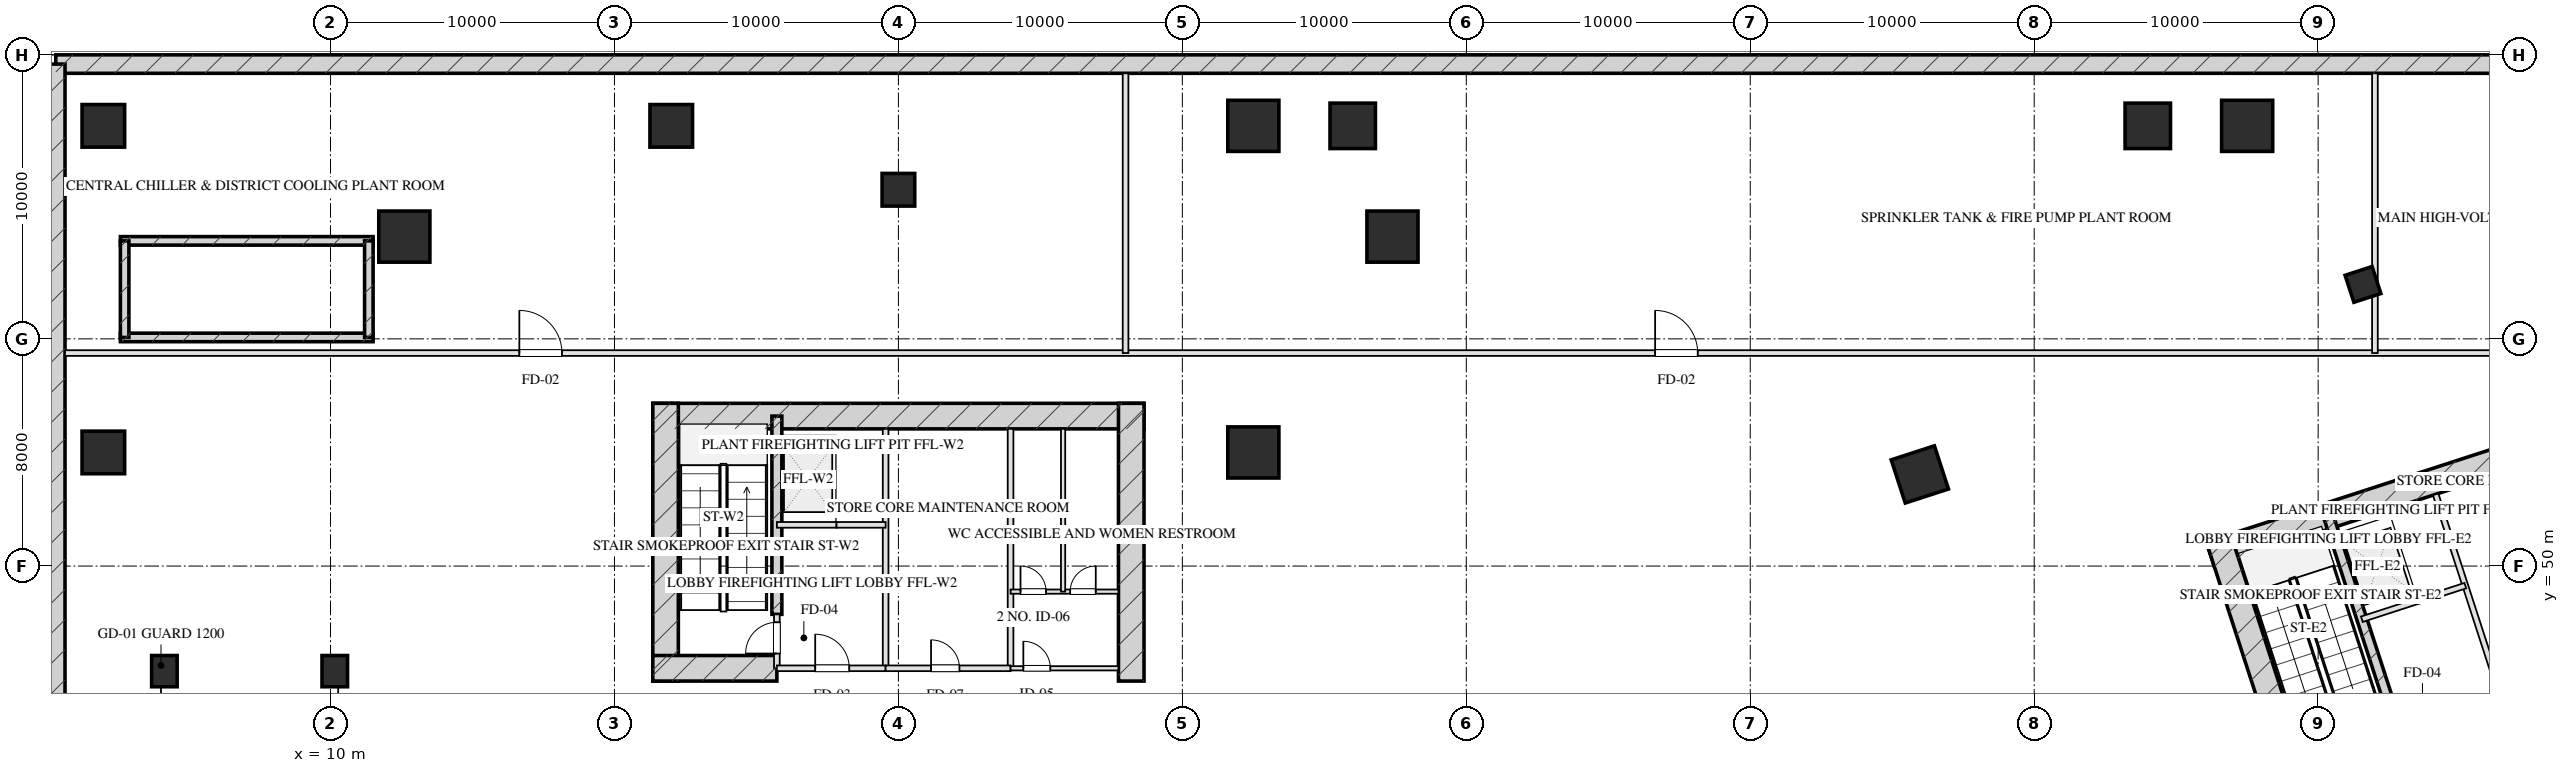
"""IFC4 building model, lengths in metres.
Left out: names, types, materials, properties, quantities, classifications, styles, units other than length and angle.
Written with IfcOpenShell. Run it as: python <this file> out.ifc"""

import sys

from ifc_helpers import new_model, si_unit, direction, frame, frame_2d, origin, origin_2d, place, context, subcontext, project, spatial, rectangle, hollow_rectangle, extrude, element, fill, save


model = new_model("IFC4")
c1 = context("Model", 3, precision=1e-05, world=origin(), true_north=direction((0.0, 1.0)))
c2 = subcontext(c1, "Body", "Model", "MODEL_VIEW")
j1 = project(units=[si_unit("LENGTHUNIT", "METRE"), si_unit("PLANEANGLEUNIT", "RADIAN")], contexts=[c1])
p1 = place(None, origin())
s1 = spatial("IfcSite", under=j1, at=p1, CompositionType="ELEMENT")
p2 = place(p1, origin())
s2 = spatial("IfcBuilding", under=s1, at=p2, CompositionType="ELEMENT")
p3 = place(p2, frame((0.0, 0.0, -12.0)))
s3 = spatial("IfcBuildingStorey", under=s2, at=p3, CompositionType="ELEMENT", Elevation=-12.0)
p4 = place(p3, frame((21.35, 55.28, 0.0), z_axis=(0.0, 0.0, 1.0), x_axis=(1.0, 0.0, 0.0)))
e1 = element("IfcWall", 1, at=p4, inside=s3, PredefinedType="SHEAR", context=c2, shape_type="SweptSolid", body=[
    extrude(rectangle(XDim=17.3, YDim=0.9, at=frame_2d((8.65, 0.0))), origin(), (0.0, 0.0, 1.0), 6.0),
])
for number, where, z_axis, x_axis in (
    (2, (21.8, 45.95, 0.0), (0.0, 0.0, 1.0), (0.0, 1.0, 0.0)),
    (3, (38.2, 45.95, 0.0), (0.0, 0.0, 1.0), (0.0, 1.0, 0.0)),
):
    element("IfcWall", number, at=place(p3, frame(where, z_axis=z_axis, x_axis=x_axis)), inside=s3, PredefinedType="SHEAR", context=c2, shape_type="SweptSolid", body=[
        extrude(rectangle(XDim=9.78, YDim=0.9, at=frame_2d((4.89, 0.0))), origin(), (0.0, 0.0, 1.0), 6.0),
    ])
p5 = place(p3, frame((25.72, 48.3, 0.0), z_axis=(0.0, 0.0, 1.0), x_axis=(0.0, 1.0, 0.0)))
e4 = element("IfcWall", 4, at=p5, inside=s3, PredefinedType="SHEAR", context=c2, shape_type="SweptSolid", body=[
    extrude(rectangle(XDim=6.98, YDim=0.35, at=frame_2d((3.49, 0.0))), origin(), (0.0, 0.0, 1.0), 6.0),
])
p6 = place(p3, frame((21.35, 46.4, 0.0), z_axis=(0.0, 0.0, 1.0), x_axis=(1.0, 0.0, 0.0)))
e5 = element("IfcWall", 5, at=p6, inside=s3, PredefinedType="SHEAR", context=c2, shape_type="SweptSolid", body=[
    extrude(rectangle(XDim=4.37, YDim=0.9, at=frame_2d((2.185, 0.0))), origin(), (0.0, 0.0, 1.0), 6.0),
])
p7 = place(p3, frame((76.201, 50.419, 0.0), z_axis=(0.0, 0.0, 1.0), x_axis=(0.951056412142, 0.309017314926, 0.0)))
e6 = element("IfcWall", 6, at=p7, inside=s3, PredefinedType="SHEAR", context=c2, shape_type="SweptSolid", body=[
    extrude(rectangle(XDim=16.7, YDim=0.9, at=frame_2d((8.35, 0.0))), origin(), (0.0, 0.0, 1.0), 6.0),
])
p8 = place(p3, frame((79.512, 41.685, 0.0), z_axis=(0.0, 0.0, 1.0), x_axis=(-0.309021722829, 0.951054979914, 0.0)))
e7 = element("IfcWall", 7, at=p8, inside=s3, PredefinedType="SHEAR", context=c2, shape_type="SweptSolid", body=[
    extrude(rectangle(XDim=9.78, YDim=0.9, at=frame_2d((4.89, 0.0))), origin(), (0.0, 0.0, 1.0), 6.0),
])
p9 = place(p3, frame((82.514, 45.131, 0.0), z_axis=(0.0, 0.0, 1.0), x_axis=(-0.308988790936, 0.951065679686, 0.0)))
e8 = element("IfcWall", 8, at=p9, inside=s3, PredefinedType="SHEAR", context=c2, shape_type="SweptSolid", body=[
    extrude(rectangle(XDim=6.98, YDim=0.35, at=frame_2d((3.49, 0.0))), origin(), (0.0, 0.0, 1.0), 6.0),
])
for number, where, z_axis, x_axis in (
    (9, (2.6, 58.05, 0.0), (0.0, 0.0, 1.0), (1.0, 0.0, 0.0)),
    (10, (2.6, 61.45, 0.0), (0.0, 0.0, 1.0), (1.0, 0.0, 0.0)),
):
    element("IfcWall", number, at=place(p3, frame(where, z_axis=z_axis, x_axis=x_axis)), inside=s3, PredefinedType="SHEAR", context=c2, shape_type="SweptSolid", body=[
        extrude(rectangle(XDim=8.9, YDim=0.3, at=frame_2d((4.45, 0.0))), origin(), (0.0, 0.0, 1.0), 6.0),
    ])
for number, where, z_axis, x_axis in (
    (11, (11.35, 58.05, 0.0), (0.0, 0.0, 1.0), (0.0, 1.0, 0.0)),
    (12, (2.75, 58.05, 0.0), (0.0, 0.0, 1.0), (0.0, 1.0, 0.0)),
):
    element("IfcWall", number, at=place(p3, frame(where, z_axis=z_axis, x_axis=x_axis)), inside=s3, PredefinedType="SHEAR", context=c2, shape_type="SweptSolid", body=[
        extrude(rectangle(XDim=3.4, YDim=0.3, at=frame_2d((1.7, 0.0))), origin(), (0.0, 0.0, 1.0), 6.0),
    ])
p10 = place(p3, frame((0.325, 67.675, 0.0), z_axis=(0.0, 0.0, 1.0), x_axis=(1.0, 0.0, 0.0)))
e13 = element("IfcWall", 13, at=p10, inside=s3, PredefinedType="SHEAR", context=c2, shape_type="SweptSolid", body=[
    extrude(rectangle(XDim=119.35, YDim=0.65, at=frame_2d((59.675, 0.0))), origin(), (0.0, 0.0, 1.0), 6.0),
])
p11 = place(p3, frame((0.325, 0.325, 0.0), z_axis=(0.0, 0.0, 1.0), x_axis=(0.0, 1.0, 0.0)))
e14 = element("IfcWall", 14, at=p11, inside=s3, PredefinedType="SHEAR", context=c2, shape_type="SweptSolid", body=[
    extrude(rectangle(XDim=67.35, YDim=0.65, at=frame_2d((33.675, 0.0))), origin(), (0.0, 0.0, 1.0), 6.0),
])
for number, where, z_axis, x_axis in (
    (15, (4.15, 46.3, 0.0), (0.0, 0.0, 1.0), (1.0, 0.0, 0.0)),
    (16, (10.15, 46.3, 0.0), (0.0, 0.0, 1.0), (1.0, 0.0, 0.0)),
):
    element("IfcColumn", number, at=place(p3, frame(where, z_axis=z_axis, x_axis=x_axis)), inside=s3, PredefinedType="COLUMN", context=c2, shape_type="SweptSolid", body=[
        extrude(rectangle(XDim=0.9, YDim=1.1, at=origin_2d()), origin(), (0.0, 0.0, 1.0), 5.65),
    ])
for number, where, z_axis, x_axis in (
    (17, (2.0, 54.0, 0.0), (0.0, 0.0, 1.0), (1.0, 0.0, 0.0)),
    (18, (2.0, 65.5, 0.0), (0.0, 0.0, 1.0), (1.0, 0.0, 0.0)),
    (19, (22.0, 65.5, 0.0), (0.0, 0.0, 1.0), (1.0, 0.0, 0.0)),
):
    element("IfcColumn", number, at=place(p3, frame(where, z_axis=z_axis, x_axis=x_axis)), inside=s3, PredefinedType="COLUMN", context=c2, shape_type="SweptSolid", body=[
        extrude(rectangle(XDim=1.5, YDim=1.5, at=origin_2d()), origin(), (0.0, 0.0, 1.0), 6.001),
    ])
for number, where, z_axis, x_axis in (
    (20, (42.5, 54.0, 0.0), (0.0, 0.0, 1.0), (1.0, 0.0, 0.0)),
    (21, (42.5, 65.5, 0.0), (0.0, 0.0, 1.0), (1.0, 0.0, 0.0)),
    (22, (77.5, 65.5, 0.0), (0.0, 0.0, 1.0), (1.0, 0.0, 0.0)),
):
    element("IfcColumn", number, at=place(p3, frame(where, z_axis=z_axis, x_axis=x_axis)), inside=s3, PredefinedType="COLUMN", context=c2, shape_type="SweptSolid", body=[
        extrude(hollow_rectangle(XDim=1.8, YDim=1.8, WallThickness=0.06, at=origin_2d()), origin(), (0.0, 0.0, 1.0), 6.001),
    ])
for number, where, z_axis, x_axis in (
    (23, (46.0, 65.5, 0.0), (0.0, 0.0, 1.0), (1.0, 0.0, 0.0)),
    (24, (74.0, 65.5, 0.0), (0.0, 0.0, 1.0), (1.0, 0.0, 0.0)),
):
    element("IfcColumn", number, at=place(p3, frame(where, z_axis=z_axis, x_axis=x_axis)), inside=s3, PredefinedType="COLUMN", context=c2, shape_type="SweptSolid", body=[
        extrude(hollow_rectangle(XDim=1.6, YDim=1.6, WallThickness=0.055, at=origin_2d()), origin(), (0.0, 0.0, 1.0), 6.001),
    ])
for number, where, z_axis, x_axis in (
    (25, (47.4, 61.6, 0.0), (0.0, 0.0, 1.0), (1.0, 0.0, 0.0)),
    (26, (12.6, 61.6, 0.0), (0.0, 0.0, 1.0), (1.0, 0.0, 0.0)),
):
    element("IfcColumn", number, at=place(p3, frame(where, z_axis=z_axis, x_axis=x_axis)), inside=s3, PredefinedType="COLUMN", context=c2, shape_type="SweptSolid", body=[
        extrude(hollow_rectangle(XDim=1.8, YDim=1.8, WallThickness=0.06, at=origin_2d()), origin(), (0.0, 0.0, 1.0), 6.001),
    ])
p12 = place(p3, frame((30.0, 63.25, 0.0), z_axis=(0.0, 0.0, 1.0), x_axis=(1.0, 0.0, 0.0)))
e27 = element("IfcColumn", 27, at=p12, inside=s3, PredefinedType="COLUMN", context=c2, shape_type="SweptSolid", body=[
    extrude(hollow_rectangle(XDim=1.15, YDim=1.15, WallThickness=0.04, at=origin_2d()), origin(), (0.0, 0.0, 1.0), 6.001),
])
p13 = place(p3, frame((65.973, 53.226, 0.0), z_axis=(0.0, 0.0, 1.0), x_axis=(0.951056516295, 0.309016994375, 0.0)))
e28 = element("IfcColumn", 28, at=p13, inside=s3, PredefinedType="COLUMN", context=c2, shape_type="SweptSolid", body=[
    extrude(hollow_rectangle(XDim=1.6, YDim=1.6, WallThickness=0.055, at=origin_2d()), origin(), (0.0, 0.0, 1.0), 6.001),
])
p14 = place(p3, frame((81.579, 59.916, 0.0), z_axis=(0.0, 0.0, 1.0), x_axis=(0.951056516295, 0.309016994375, 0.0)))
e29 = element("IfcColumn", 29, at=p14, inside=s3, PredefinedType="COLUMN", context=c2, shape_type="SweptSolid", body=[
    extrude(hollow_rectangle(XDim=1.0, YDim=1.0, WallThickness=0.036, at=origin_2d()), origin(), (0.0, 0.0, 1.0), 6.001),
])
p15 = place(p3, frame((25.72, 46.4, 0.0), z_axis=(0.0, 0.0, 1.0), x_axis=(0.0, 1.0, 0.0)))
e30 = element("IfcWall", 30, at=p15, inside=s3, PredefinedType="PARTITIONING", context=c2, shape_type="SweptSolid", body=[
    extrude(rectangle(XDim=1.9, YDim=0.2, at=frame_2d((0.95, 0.0))), origin(), (0.0, 0.0, 1.0), 5.635),
])
p16 = place(p15, frame((0.52, 0.0, 0.0)))
e31 = element("IfcOpeningElement", 31, at=p16, cuts=e30, PredefinedType="OPENING", context=c2, shape_type="SweptSolid", body=[
    extrude(rectangle(XDim=1.1, YDim=2.05, at=frame_2d((0.55, 1.025))), frame((0.0, 0.11, 0.0), z_axis=(0.0, -1.0, 0.0), x_axis=(1.0, 0.0, 0.0)), (0.0, 0.0, 1.0), 0.22),
])
p17 = place(p3, frame((29.55, 46.4, 0.0), z_axis=(0.0, 0.0, 1.0), x_axis=(0.0, 1.0, 0.0)))
e32 = element("IfcWall", 32, at=p17, inside=s3, PredefinedType="PARTITIONING", context=c2, shape_type="SweptSolid", body=[
    extrude(rectangle(XDim=8.43, YDim=0.2, at=frame_2d((4.215, 0.0))), origin(), (0.0, 0.0, 1.0), 5.635),
])
p18 = place(p3, frame((25.72, 46.4, 0.0), z_axis=(0.0, 0.0, 1.0), x_axis=(1.0, 0.0, 0.0)))
e33 = element("IfcWall", 33, at=p18, inside=s3, PredefinedType="PARTITIONING", context=c2, shape_type="SweptSolid", body=[
    extrude(rectangle(XDim=3.83, YDim=0.2, at=frame_2d((1.915, 0.0))), origin(), (0.0, 0.0, 1.0), 5.635),
])
p19 = place(p18, frame((1.35, 0.0, 0.0)))
e34 = element("IfcOpeningElement", 34, at=p19, cuts=e33, PredefinedType="OPENING", context=c2, shape_type="SweptSolid", body=[
    extrude(rectangle(XDim=1.2, YDim=2.05, at=frame_2d((0.6, 1.025))), frame((0.0, 0.11, 0.0), z_axis=(0.0, -1.0, 0.0), x_axis=(1.0, 0.0, 0.0)), (0.0, 0.0, 1.0), 0.22),
])
p20 = place(p3, frame((25.72, 51.45, 0.0), z_axis=(0.0, 0.0, 1.0), x_axis=(1.0, 0.0, 0.0)))
e35 = element("IfcWall", 35, at=p20, inside=s3, PredefinedType="PARTITIONING", context=c2, shape_type="SweptSolid", body=[
    extrude(rectangle(XDim=2.1, YDim=0.2, at=frame_2d((1.05, 0.0))), origin(), (0.0, 0.0, 1.0), 5.635),
])
p21 = place(p3, frame((27.82, 51.45, 0.0), z_axis=(0.0, 0.0, 1.0), x_axis=(1.0, 0.0, 0.0)))
e36 = element("IfcWall", 36, at=p21, inside=s3, PredefinedType="PARTITIONING", context=c2, shape_type="SweptSolid", body=[
    extrude(rectangle(XDim=1.73, YDim=0.2, at=frame_2d((0.865, 0.0))), origin(), (0.0, 0.0, 1.0), 5.635),
])
p22 = place(p3, frame((33.95, 46.4, 0.0), z_axis=(0.0, 0.0, 1.0), x_axis=(0.0, 1.0, 0.0)))
e37 = element("IfcWall", 37, at=p22, inside=s3, PredefinedType="PARTITIONING", context=c2, shape_type="SweptSolid", body=[
    extrude(rectangle(XDim=8.43, YDim=0.2, at=frame_2d((4.215, 0.0))), origin(), (0.0, 0.0, 1.0), 5.635),
])
p23 = place(p3, frame((29.55, 46.4, 0.0), z_axis=(0.0, 0.0, 1.0), x_axis=(1.0, 0.0, 0.0)))
e38 = element("IfcWall", 38, at=p23, inside=s3, PredefinedType="PARTITIONING", context=c2, shape_type="SweptSolid", body=[
    extrude(rectangle(XDim=4.4, YDim=0.2, at=frame_2d((2.2, 0.0))), origin(), (0.0, 0.0, 1.0), 5.635),
])
p24 = place(p23, frame((1.6, 0.0, 0.0)))
e39 = element("IfcOpeningElement", 39, at=p24, cuts=e38, PredefinedType="OPENING", context=c2, shape_type="SweptSolid", body=[
    extrude(rectangle(XDim=1.0, YDim=2.05, at=frame_2d((0.5, 1.025))), frame((0.0, 0.11, 0.0), z_axis=(0.0, -1.0, 0.0), x_axis=(1.0, 0.0, 0.0)), (0.0, 0.0, 1.0), 0.22),
])
p25 = place(p3, frame((33.95, 46.4, 0.0), z_axis=(0.0, 0.0, 1.0), x_axis=(1.0, 0.0, 0.0)))
e40 = element("IfcWall", 40, at=p25, inside=s3, PredefinedType="PARTITIONING", context=c2, shape_type="SweptSolid", body=[
    extrude(rectangle(XDim=3.8, YDim=0.15, at=frame_2d((1.9, 0.0))), origin(), (0.0, 0.0, 1.0), 5.635),
])
p26 = place(p25, frame((0.45, 0.0, 0.0)))
e41 = element("IfcOpeningElement", 41, at=p26, cuts=e40, PredefinedType="OPENING", context=c2, shape_type="SweptSolid", body=[
    extrude(rectangle(XDim=0.95, YDim=2.05, at=frame_2d((0.475, 1.025))), frame((0.0, 0.085, 0.0), z_axis=(0.0, -1.0, 0.0), x_axis=(1.0, 0.0, 0.0)), (0.0, 0.0, 1.0), 0.17),
])
p27 = place(p3, frame((33.95, 49.1, 0.0), z_axis=(0.0, 0.0, 1.0), x_axis=(1.0, 0.0, 0.0)))
e42 = element("IfcWall", 42, at=p27, inside=s3, PredefinedType="PARTITIONING", context=c2, shape_type="SweptSolid", body=[
    extrude(rectangle(XDim=3.8, YDim=0.15, at=frame_2d((1.9, 0.0))), origin(), (0.0, 0.0, 1.0), 5.635),
])
p28 = place(p27, frame((0.35, 0.0, 0.0)))
e43 = element("IfcOpeningElement", 43, at=p28, cuts=e42, PredefinedType="OPENING", context=c2, shape_type="SweptSolid", body=[
    extrude(rectangle(XDim=0.9, YDim=2.05, at=frame_2d((0.45, 1.025))), frame((0.0, 0.085, 0.0), z_axis=(0.0, -1.0, 0.0), x_axis=(1.0, 0.0, 0.0)), (0.0, 0.0, 1.0), 0.17),
])
p29 = place(p27, frame((2.1, 0.0, 0.0)))
e44 = element("IfcOpeningElement", 44, at=p29, cuts=e42, PredefinedType="OPENING", context=c2, shape_type="SweptSolid", body=[
    extrude(rectangle(XDim=0.9, YDim=2.05, at=frame_2d((0.45, 1.025))), frame((0.0, 0.085, 0.0), z_axis=(0.0, -1.0, 0.0), x_axis=(1.0, 0.0, 0.0)), (0.0, 0.0, 1.0), 0.17),
])
p30 = place(p3, frame((35.8, 49.1, 0.0), z_axis=(0.0, 0.0, 1.0), x_axis=(0.0, 1.0, 0.0)))
e45 = element("IfcWall", 45, at=p30, inside=s3, PredefinedType="PARTITIONING", context=c2, shape_type="SweptSolid", body=[
    extrude(rectangle(XDim=5.73, YDim=0.15, at=frame_2d((2.865, 0.0))), origin(), (0.0, 0.0, 1.0), 5.635),
])
p31 = place(p3, frame((86.743, 44.508, 0.0), z_axis=(0.0, 0.0, 1.0), x_axis=(-0.309016001439, 0.951056838919, 0.0)))
e46 = element("IfcWall", 46, at=p31, inside=s3, PredefinedType="PARTITIONING", context=c2, shape_type="SweptSolid", body=[
    extrude(rectangle(XDim=8.43, YDim=0.2, at=frame_2d((4.215, 0.0))), origin(), (0.0, 0.0, 1.0), 5.635),
])
p32 = place(p3, frame((81.54, 48.127, 0.0), z_axis=(0.0, 0.0, 1.0), x_axis=(0.951062257173, 0.308999325213, 0.0)))
e47 = element("IfcWall", 47, at=p32, inside=s3, PredefinedType="PARTITIONING", context=c2, shape_type="SweptSolid", body=[
    extrude(rectangle(XDim=2.1, YDim=0.2, at=frame_2d((1.05, 0.0))), origin(), (0.0, 0.0, 1.0), 5.635),
])
p33 = place(p3, frame((83.538, 48.776, 0.0), z_axis=(0.0, 0.0, 1.0), x_axis=(0.951041328149, 0.309063734775, 0.0)))
e48 = element("IfcWall", 48, at=p33, inside=s3, PredefinedType="PARTITIONING", context=c2, shape_type="SweptSolid", body=[
    extrude(rectangle(XDim=1.73, YDim=0.2, at=frame_2d((0.865, 0.0))), origin(), (0.0, 0.0, 1.0), 5.635),
])
p34 = place(p3, frame((0.65, 57.5, 0.0), z_axis=(0.0, 0.0, 1.0), x_axis=(1.0, 0.0, 0.0)))
e49 = element("IfcWall", 49, at=p34, inside=s3, PredefinedType="PARTITIONING", context=c2, shape_type="SweptSolid", body=[
    extrude(rectangle(XDim=118.7, YDim=0.2, at=frame_2d((59.35, 0.0))), origin(), (0.0, 0.0, 1.0), 5.635),
])
p35 = place(p34, frame((16.0, 0.0, 0.0)))
e50 = element("IfcOpeningElement", 50, at=p35, cuts=e49, PredefinedType="OPENING", context=c2, shape_type="SweptSolid", body=[
    extrude(rectangle(XDim=1.5, YDim=2.05, at=frame_2d((0.75, 1.025))), frame((0.0, 0.11, 0.0), z_axis=(0.0, -1.0, 0.0), x_axis=(1.0, 0.0, 0.0)), (0.0, 0.0, 1.0), 0.22),
])
p36 = place(p34, frame((56.0, 0.0, 0.0)))
e51 = element("IfcOpeningElement", 51, at=p36, cuts=e49, PredefinedType="OPENING", context=c2, shape_type="SweptSolid", body=[
    extrude(rectangle(XDim=1.5, YDim=2.05, at=frame_2d((0.75, 1.025))), frame((0.0, 0.11, 0.0), z_axis=(0.0, -1.0, 0.0), x_axis=(1.0, 0.0, 0.0)), (0.0, 0.0, 1.0), 0.22),
])
p37 = place(p34, frame((95.0, 0.0, 0.0)))
e52 = element("IfcOpeningElement", 52, at=p37, cuts=e49, PredefinedType="OPENING", context=c2, shape_type="SweptSolid", body=[
    extrude(rectangle(XDim=1.5, YDim=2.05, at=frame_2d((0.75, 1.025))), frame((0.0, 0.11, 0.0), z_axis=(0.0, -1.0, 0.0), x_axis=(1.0, 0.0, 0.0)), (0.0, 0.0, 1.0), 0.22),
])
for number, where, z_axis, x_axis in (
    (53, (38.0, 57.5, 0.0), (0.0, 0.0, 1.0), (0.0, 1.0, 0.0)),
    (54, (82.0, 57.5, 0.0), (0.0, 0.0, 1.0), (0.0, 1.0, 0.0)),
):
    element("IfcWall", number, at=place(p3, frame(where, z_axis=z_axis, x_axis=x_axis)), inside=s3, PredefinedType="PARTITIONING", context=c2, shape_type="SweptSolid", body=[
        extrude(rectangle(XDim=9.85, YDim=0.2, at=frame_2d((4.925, 0.0))), origin(), (0.0, 0.0, 1.0), 5.635),
    ])
p38 = place(p16, origin())
e55 = element("IfcDoor", 55, at=p38, inside=s3, OperationType="SINGLE_SWING_LEFT", PredefinedType="DOOR", context=c2, shape_type="SweptSolid", body=[
    extrude(rectangle(XDim=1.1, YDim=2.05, at=frame_2d((0.55, 1.025))), frame((0.0, 0.025, 0.0), z_axis=(0.0, -1.0, 0.0), x_axis=(1.0, 0.0, 0.0)), (0.0, 0.0, 1.0), 0.05),
])
fill(e31, e55)
p39 = place(p19, origin())
e56 = element("IfcDoor", 56, at=p39, inside=s3, OperationType="SINGLE_SWING_LEFT", PredefinedType="DOOR", context=c2, shape_type="SweptSolid", body=[
    extrude(rectangle(XDim=1.2, YDim=2.05, at=frame_2d((0.6, 1.025))), frame((0.0, 0.025, 0.0), z_axis=(0.0, -1.0, 0.0), x_axis=(1.0, 0.0, 0.0)), (0.0, 0.0, 1.0), 0.05),
])
fill(e34, e56)
p40 = place(p24, origin())
e57 = element("IfcDoor", 57, at=p40, inside=s3, OperationType="SINGLE_SWING_LEFT", PredefinedType="DOOR", context=c2, shape_type="SweptSolid", body=[
    extrude(rectangle(XDim=1.0, YDim=2.05, at=frame_2d((0.5, 1.025))), frame((0.0, 0.025, 0.0), z_axis=(0.0, -1.0, 0.0), x_axis=(1.0, 0.0, 0.0)), (0.0, 0.0, 1.0), 0.05),
])
fill(e39, e57)
p41 = place(p26, origin())
e58 = element("IfcDoor", 58, at=p41, inside=s3, OperationType="SINGLE_SWING_LEFT", PredefinedType="DOOR", context=c2, shape_type="SweptSolid", body=[
    extrude(rectangle(XDim=0.95, YDim=2.05, at=frame_2d((0.475, 1.025))), frame((0.0, 0.025, 0.0), z_axis=(0.0, -1.0, 0.0), x_axis=(1.0, 0.0, 0.0)), (0.0, 0.0, 1.0), 0.05),
])
fill(e41, e58)
p42 = place(p28, origin())
e59 = element("IfcDoor", 59, at=p42, inside=s3, OperationType="SINGLE_SWING_LEFT", PredefinedType="DOOR", context=c2, shape_type="SweptSolid", body=[
    extrude(rectangle(XDim=0.9, YDim=2.05, at=frame_2d((0.45, 1.025))), frame((0.0, 0.025, 0.0), z_axis=(0.0, -1.0, 0.0), x_axis=(1.0, 0.0, 0.0)), (0.0, 0.0, 1.0), 0.05),
])
fill(e43, e59)
p43 = place(p29, origin())
e60 = element("IfcDoor", 60, at=p43, inside=s3, OperationType="SINGLE_SWING_RIGHT", PredefinedType="DOOR", context=c2, shape_type="SweptSolid", body=[
    extrude(rectangle(XDim=0.9, YDim=2.05, at=frame_2d((0.45, 1.025))), frame((0.0, 0.025, 0.0), z_axis=(0.0, -1.0, 0.0), x_axis=(1.0, 0.0, 0.0)), (0.0, 0.0, 1.0), 0.05),
])
fill(e44, e60)
p44 = place(p35, origin())
e61 = element("IfcDoor", 61, at=p44, inside=s3, OperationType="SINGLE_SWING_LEFT", PredefinedType="DOOR", context=c2, shape_type="SweptSolid", body=[
    extrude(rectangle(XDim=1.5, YDim=2.05, at=frame_2d((0.75, 1.025))), frame((0.0, 0.025, 0.0), z_axis=(0.0, -1.0, 0.0), x_axis=(1.0, 0.0, 0.0)), (0.0, 0.0, 1.0), 0.05),
])
fill(e50, e61)
p45 = place(p36, origin())
e62 = element("IfcDoor", 62, at=p45, inside=s3, OperationType="SINGLE_SWING_LEFT", PredefinedType="DOOR", context=c2, shape_type="SweptSolid", body=[
    extrude(rectangle(XDim=1.5, YDim=2.05, at=frame_2d((0.75, 1.025))), frame((0.0, 0.025, 0.0), z_axis=(0.0, -1.0, 0.0), x_axis=(1.0, 0.0, 0.0)), (0.0, 0.0, 1.0), 0.05),
])
fill(e51, e62)
save(model, sys.argv[1])
